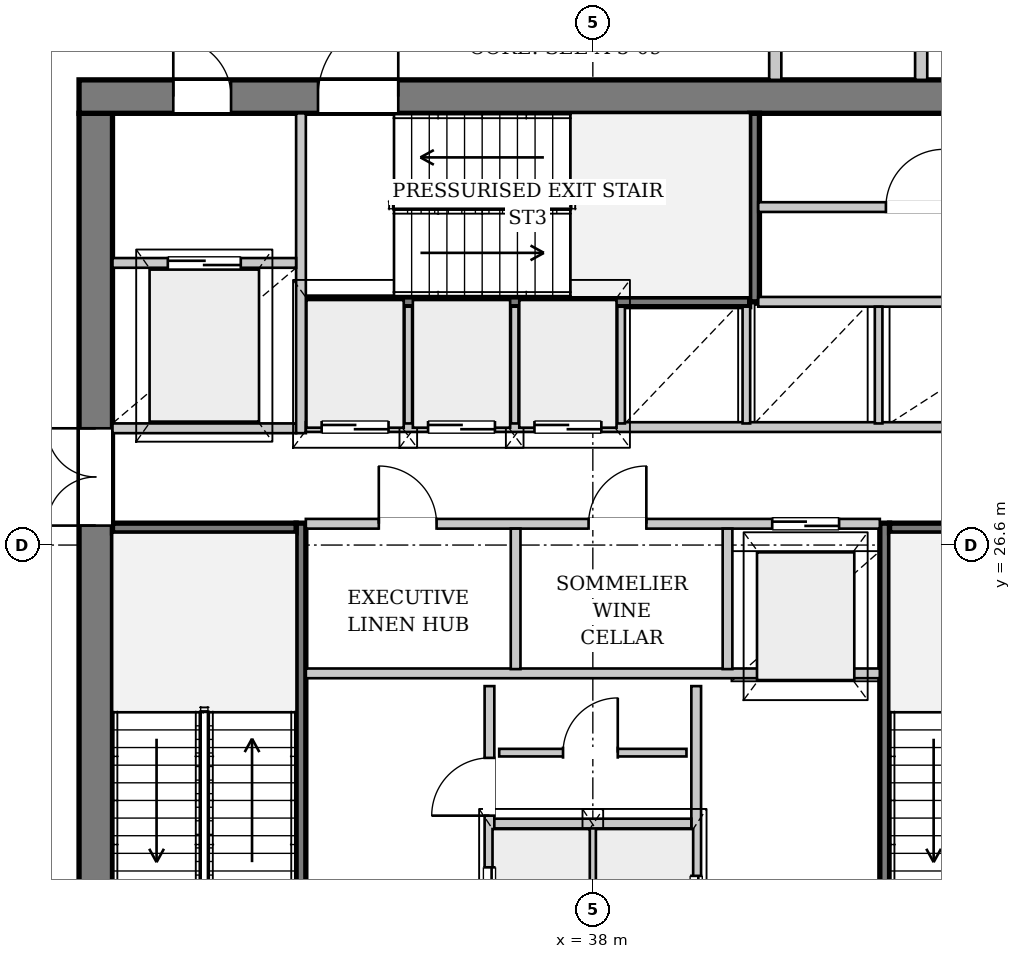
"""IFC4 building model, lengths in metres.
Left out: names, types, materials, properties, quantities, classifications, styles, units other than length and angle.
Written with IfcOpenShell. Run it as: python <this file> out.ifc"""

import sys

from ifc_helpers import new_model, si_unit, direction, frame, frame_2d, origin, place, context, subcontext, project, spatial, rectangle, extrude, source, transform, mapped, element, fill, save


model = new_model("IFC4")
c1 = context("Model", 3, precision=1e-05, world=origin(), true_north=direction((0.0, 1.0)))
c2 = subcontext(c1, "Body", "Model", "MODEL_VIEW")
j1 = project(units=[si_unit("LENGTHUNIT", "METRE"), si_unit("PLANEANGLEUNIT", "RADIAN")], contexts=[c1])
p1 = place(None, origin())
s1 = spatial("IfcSite", under=j1, at=p1, CompositionType="ELEMENT")
p2 = place(p1, origin())
s2 = spatial("IfcBuilding", under=s1, at=p2, CompositionType="ELEMENT")
p3 = place(p2, frame((0.0, 0.0, 160.8)))
s3 = spatial("IfcBuildingStorey", under=s2, at=p3, CompositionType="ELEMENT", Elevation=160.8)
p4 = place(p3, frame((29.825, 19.5, 0.0), z_axis=(0.0, 0.0, 1.0), x_axis=(0.0, 1.0, 0.0)))
e1 = element("IfcWall", 1, at=p4, inside=s3, PredefinedType="SHEAR", context=c2, shape_type="SweptSolid", body=[
    extrude(rectangle(XDim=14.2, YDim=0.55, at=frame_2d((7.1, 0.0))), origin(), (0.0, 0.0, 1.0), 3.33),
])
p5 = place(p4, frame((7.42, 0.0, 0.0)))
e2 = element("IfcOpeningElement", 2, at=p5, cuts=e1, PredefinedType="OPENING", context=c2, shape_type="SweptSolid", body=[
    extrude(rectangle(XDim=1.6, YDim=2.2, at=frame_2d((0.8, 1.1))), frame((0.0, 0.285, 0.0), z_axis=(0.0, -1.0, 0.0), x_axis=(1.0, 0.0, 0.0)), (0.0, 0.0, 1.0), 0.57),
])
p6 = place(p3, frame((29.55, 33.975, 0.0), z_axis=(0.0, 0.0, 1.0), x_axis=(1.0, 0.0, 0.0)))
e3 = element("IfcWall", 3, at=p6, inside=s3, PredefinedType="SHEAR", context=c2, shape_type="SweptSolid", body=[
    extrude(rectangle(XDim=16.9, YDim=0.55, at=frame_2d((8.45, 0.0))), origin(), (0.0, 0.0, 1.0), 3.33),
])
p7 = place(p6, frame((1.55, 0.0, 0.0)))
e4 = element("IfcOpeningElement", 4, at=p7, cuts=e3, PredefinedType="OPENING", context=c2, shape_type="SweptSolid", body=[
    extrude(rectangle(XDim=0.95, YDim=2.1, at=frame_2d((0.475, 1.05))), frame((0.0, 0.285, 0.0), z_axis=(0.0, -1.0, 0.0), x_axis=(1.0, 0.0, 0.0)), (0.0, 0.0, 1.0), 0.57),
])
p8 = place(p6, frame((3.93, 0.0, 0.0)))
e5 = element("IfcOpeningElement", 5, at=p8, cuts=e3, PredefinedType="OPENING", context=c2, shape_type="SweptSolid", body=[
    extrude(rectangle(XDim=1.32, YDim=2.2, at=frame_2d((0.66, 1.1))), frame((0.0, 0.285, 0.0), z_axis=(0.0, -1.0, 0.0), x_axis=(1.0, 0.0, 0.0)), (0.0, 0.0, 1.0), 0.57),
])
p9 = place(p3, frame((33.2, 19.5, 0.0), z_axis=(0.0, 0.0, 1.0), x_axis=(0.0, 1.0, 0.0)))
e6 = element("IfcWall", 6, at=p9, inside=s3, PredefinedType="PARTITIONING", context=c2, shape_type="SweptSolid", body=[
    extrude(rectangle(XDim=7.46, YDim=0.16, at=frame_2d((3.73, 0.0))), origin(), (0.0, 0.0, 1.0), 3.33),
])
p10 = place(p9, frame((0.08, 0.0, 0.0)))
e7 = element("IfcOpeningElement", 7, at=p10, cuts=e6, PredefinedType="OPENING", context=c2, shape_type="SweptSolid", body=[
    extrude(rectangle(XDim=1.32, YDim=2.2, at=frame_2d((0.66, 1.1))), frame((0.0, 0.09, 0.0), z_axis=(0.0, -1.0, 0.0), x_axis=(1.0, 0.0, 0.0)), (0.0, 0.0, 1.0), 0.18),
])
p11 = place(p3, frame((30.1, 26.88, 0.0), z_axis=(0.0, 0.0, 1.0), x_axis=(1.0, 0.0, 0.0)))
e8 = element("IfcWall", 8, at=p11, inside=s3, PredefinedType="PARTITIONING", context=c2, shape_type="SweptSolid", body=[
    extrude(rectangle(XDim=3.02, YDim=0.16, at=frame_2d((1.51, 0.0))), origin(), (0.0, 0.0, 1.0), 3.33),
])
p12 = place(p3, frame((42.8, 26.96, 0.0), z_axis=(0.0, 0.0, 1.0), x_axis=(0.0, -1.0, 0.0)))
e9 = element("IfcWall", 9, at=p12, inside=s3, PredefinedType="PARTITIONING", context=c2, shape_type="SweptSolid", body=[
    extrude(rectangle(XDim=7.46, YDim=0.16, at=frame_2d((3.73, 0.0))), origin(), (0.0, 0.0, 1.0), 3.33),
])
p13 = place(p12, frame((6.06, 0.0, 0.0)))
e10 = element("IfcOpeningElement", 10, at=p13, cuts=e9, PredefinedType="OPENING", context=c2, shape_type="SweptSolid", body=[
    extrude(rectangle(XDim=1.32, YDim=2.2, at=frame_2d((0.66, 1.1))), frame((0.0, 0.09, 0.0), z_axis=(0.0, -1.0, 0.0), x_axis=(1.0, 0.0, 0.0)), (0.0, 0.0, 1.0), 0.18),
])
p14 = place(p3, frame((42.88, 26.88, 0.0), z_axis=(0.0, 0.0, 1.0), x_axis=(1.0, 0.0, 0.0)))
e11 = element("IfcWall", 11, at=p14, inside=s3, PredefinedType="PARTITIONING", context=c2, shape_type="SweptSolid", body=[
    extrude(rectangle(XDim=3.02, YDim=0.16, at=frame_2d((1.51, 0.0))), origin(), (0.0, 0.0, 1.0), 3.33),
])
p15 = place(p3, frame((33.28, 30.6, 0.0), z_axis=(0.0, 0.0, 1.0), x_axis=(1.0, 0.0, 0.0)))
e12 = element("IfcWall", 12, at=p15, inside=s3, PredefinedType="PARTITIONING", context=c2, shape_type="SweptSolid", body=[
    extrude(rectangle(XDim=7.3, YDim=0.16, at=frame_2d((3.65, 0.0))), origin(), (0.0, 0.0, 1.0), 3.33),
])
p16 = place(p3, frame((40.66, 30.6, 0.0), z_axis=(0.0, 0.0, 1.0), x_axis=(0.0, 1.0, 0.0)))
e13 = element("IfcWall", 13, at=p16, inside=s3, PredefinedType="PARTITIONING", context=c2, shape_type="SweptSolid", body=[
    extrude(rectangle(XDim=3.1, YDim=0.16, at=frame_2d((1.55, 0.0))), origin(), (0.0, 0.0, 1.0), 3.33),
])
p17 = place(p3, frame((36.3, 19.5, 0.0), z_axis=(0.0, 0.0, 1.0), x_axis=(0.0, 1.0, 0.0)))
e14 = element("IfcWall", 14, at=p17, inside=s3, PredefinedType="PARTITIONING", context=c2, shape_type="SweptSolid", body=[
    extrude(rectangle(XDim=4.78, YDim=0.16, at=frame_2d((2.39, 0.0))), origin(), (0.0, 0.0, 1.0), 3.33),
])
p18 = place(p17, frame((0.6, 0.0, 0.0)))
e15 = element("IfcOpeningElement", 15, at=p18, cuts=e14, PredefinedType="OPENING", context=c2, shape_type="SweptSolid", body=[
    extrude(rectangle(XDim=1.2, YDim=2.2, at=frame_2d((0.6, 1.1))), frame((0.0, 0.09, 0.0), z_axis=(0.0, -1.0, 0.0), x_axis=(1.0, 0.0, 0.0)), (0.0, 0.0, 1.0), 0.18),
])
p19 = place(p17, frame((2.65, 0.0, 0.0)))
e16 = element("IfcOpeningElement", 16, at=p19, cuts=e14, PredefinedType="OPENING", context=c2, shape_type="SweptSolid", body=[
    extrude(rectangle(XDim=0.95, YDim=2.1, at=frame_2d((0.475, 1.05))), frame((0.0, 0.09, 0.0), z_axis=(0.0, -1.0, 0.0), x_axis=(1.0, 0.0, 0.0)), (0.0, 0.0, 1.0), 0.18),
])
p20 = place(p3, frame((39.7, 24.28, 0.0), z_axis=(0.0, 0.0, 1.0), x_axis=(0.0, -1.0, 0.0)))
e17 = element("IfcWall", 17, at=p20, inside=s3, PredefinedType="PARTITIONING", context=c2, shape_type="SweptSolid", body=[
    extrude(rectangle(XDim=4.78, YDim=0.16, at=frame_2d((2.39, 0.0))), origin(), (0.0, 0.0, 1.0), 3.33),
])
p21 = place(p20, frame((3.12, 0.0, 0.0)))
e18 = element("IfcOpeningElement", 18, at=p21, cuts=e17, PredefinedType="OPENING", context=c2, shape_type="SweptSolid", body=[
    extrude(rectangle(XDim=1.2, YDim=2.2, at=frame_2d((0.6, 1.1))), frame((0.0, 0.09, 0.0), z_axis=(0.0, -1.0, 0.0), x_axis=(1.0, 0.0, 0.0)), (0.0, 0.0, 1.0), 0.18),
])
p22 = place(p3, frame((38.0, 19.5, 0.0), z_axis=(0.0, 0.0, 1.0), x_axis=(0.0, 1.0, 0.0)))
e19 = element("IfcWall", 19, at=p22, inside=s3, PredefinedType="PARTITIONING", context=c2, shape_type="SweptSolid", body=[
    extrude(rectangle(XDim=2.46, YDim=0.125, at=frame_2d((1.23, 0.0))), origin(), (0.0, 0.0, 1.0), 3.33),
])
p23 = place(p3, frame((36.38, 22.02, 0.0), z_axis=(0.0, 0.0, 1.0), x_axis=(1.0, 0.0, 0.0)))
e20 = element("IfcWall", 20, at=p23, inside=s3, PredefinedType="PARTITIONING", context=c2, shape_type="SweptSolid", body=[
    extrude(rectangle(XDim=3.24, YDim=0.16, at=frame_2d((1.62, 0.0))), origin(), (0.0, 0.0, 1.0), 3.33),
])
p24 = place(p3, frame((33.28, 24.49, 0.0), z_axis=(0.0, 0.0, 1.0), x_axis=(1.0, 0.0, 0.0)))
e21 = element("IfcWall", 21, at=p24, inside=s3, PredefinedType="PARTITIONING", context=c2, shape_type="SweptSolid", body=[
    extrude(rectangle(XDim=9.44, YDim=0.16, at=frame_2d((4.72, 0.0))), origin(), (0.0, 0.0, 1.0), 3.33),
])
p25 = place(p3, frame((36.46, 23.186, 0.0), z_axis=(0.0, 0.0, 1.0), x_axis=(1.0, 0.0, 0.0)))
e22 = element("IfcWall", 22, at=p25, inside=s3, PredefinedType="PARTITIONING", context=c2, shape_type="SweptSolid", body=[
    extrude(rectangle(XDim=3.08, YDim=0.125, at=frame_2d((1.54, 0.0))), origin(), (0.0, 0.0, 1.0), 3.33),
])
p26 = place(p25, frame((1.05, 0.0, 0.0)))
e23 = element("IfcOpeningElement", 23, at=p26, cuts=e22, PredefinedType="OPENING", context=c2, shape_type="SweptSolid", body=[
    extrude(rectangle(XDim=0.9, YDim=2.1, at=frame_2d((0.45, 1.05))), frame((0.0, 0.073, 0.0), z_axis=(0.0, -1.0, 0.0), x_axis=(1.0, 0.0, 0.0)), (0.0, 0.0, 1.0), 0.145),
])
p27 = place(p3, frame((30.1, 28.52, 0.0), z_axis=(0.0, 0.0, 1.0), x_axis=(1.0, 0.0, 0.0)))
e24 = element("IfcWall", 24, at=p27, inside=s3, PredefinedType="PARTITIONING", context=c2, shape_type="SweptSolid", body=[
    extrude(rectangle(XDim=3.02, YDim=0.16, at=frame_2d((1.51, 0.0))), origin(), (0.0, 0.0, 1.0), 3.33),
])
p28 = place(p3, frame((33.2, 28.44, 0.0), z_axis=(0.0, 0.0, 1.0), x_axis=(0.0, 1.0, 0.0)))
e25 = element("IfcWall", 25, at=p28, inside=s3, PredefinedType="PARTITIONING", context=c2, shape_type="SweptSolid", body=[
    extrude(rectangle(XDim=5.26, YDim=0.16, at=frame_2d((2.63, 0.0))), origin(), (0.0, 0.0, 1.0), 3.33),
])
p29 = place(p3, frame((30.1, 31.24, 0.0), z_axis=(0.0, 0.0, 1.0), x_axis=(1.0, 0.0, 0.0)))
e26 = element("IfcWall", 26, at=p29, inside=s3, PredefinedType="PARTITIONING", context=c2, shape_type="SweptSolid", body=[
    extrude(rectangle(XDim=3.02, YDim=0.16, at=frame_2d((1.51, 0.0))), origin(), (0.0, 0.0, 1.0), 3.33),
])
p30 = place(p29, frame((0.91, 0.0, 0.0)))
e27 = element("IfcOpeningElement", 27, at=p30, cuts=e26, PredefinedType="OPENING", context=c2, shape_type="SweptSolid", body=[
    extrude(rectangle(XDim=1.2, YDim=2.2, at=frame_2d((0.6, 1.1))), frame((0.0, 0.09, 0.0), z_axis=(0.0, -1.0, 0.0), x_axis=(1.0, 0.0, 0.0)), (0.0, 0.0, 1.0), 0.18),
])
p31 = place(p3, frame((33.28, 26.95, 0.0), z_axis=(0.0, 0.0, 1.0), x_axis=(1.0, 0.0, 0.0)))
e28 = element("IfcWall", 28, at=p31, inside=s3, PredefinedType="PARTITIONING", context=c2, shape_type="SweptSolid", body=[
    extrude(rectangle(XDim=9.44, YDim=0.16, at=frame_2d((4.72, 0.0))), origin(), (0.0, 0.0, 1.0), 3.33),
])
p32 = place(p31, frame((1.2, 0.0, 0.0)))
e29 = element("IfcOpeningElement", 29, at=p32, cuts=e28, PredefinedType="OPENING", context=c2, shape_type="SweptSolid", body=[
    extrude(rectangle(XDim=0.95, YDim=2.1, at=frame_2d((0.475, 1.05))), frame((0.0, 0.09, 0.0), z_axis=(0.0, -1.0, 0.0), x_axis=(1.0, 0.0, 0.0)), (0.0, 0.0, 1.0), 0.18),
])
p33 = place(p31, frame((4.65, 0.0, 0.0)))
e30 = element("IfcOpeningElement", 30, at=p33, cuts=e28, PredefinedType="OPENING", context=c2, shape_type="SweptSolid", body=[
    extrude(rectangle(XDim=0.95, YDim=2.1, at=frame_2d((0.475, 1.05))), frame((0.0, 0.09, 0.0), z_axis=(0.0, -1.0, 0.0), x_axis=(1.0, 0.0, 0.0)), (0.0, 0.0, 1.0), 0.18),
])
p34 = place(p31, frame((7.67, 0.0, 0.0)))
e31 = element("IfcOpeningElement", 31, at=p34, cuts=e28, PredefinedType="OPENING", context=c2, shape_type="SweptSolid", body=[
    extrude(rectangle(XDim=1.1, YDim=2.2, at=frame_2d((0.55, 1.1))), frame((0.0, 0.09, 0.0), z_axis=(0.0, -1.0, 0.0), x_axis=(1.0, 0.0, 0.0)), (0.0, 0.0, 1.0), 0.18),
])
for number, where, z_axis, x_axis in (
    (32, (36.73, 24.56, 0.0), (0.0, 0.0, 1.0), (0.0, 1.0, 0.0)),
    (33, (40.215, 24.56, 0.0), (0.0, 0.0, 1.0), (0.0, 1.0, 0.0)),
):
    element("IfcWall", number, at=place(p3, frame(where, z_axis=z_axis, x_axis=x_axis)), inside=s3, PredefinedType="PARTITIONING", context=c2, shape_type="SweptSolid", body=[
        extrude(rectangle(XDim=2.31, YDim=0.16, at=frame_2d((1.155, 0.0))), origin(), (0.0, 0.0, 1.0), 3.33),
    ])
p35 = place(p3, frame((33.28, 28.54, 0.0), z_axis=(0.0, 0.0, 1.0), x_axis=(1.0, 0.0, 0.0)))
e34 = element("IfcWall", 34, at=p35, inside=s3, PredefinedType="PARTITIONING", context=c2, shape_type="SweptSolid", body=[
    extrude(rectangle(XDim=12.62, YDim=0.16, at=frame_2d((6.31, 0.0))), origin(), (0.0, 0.0, 1.0), 3.33),
])
p36 = place(p35, frame((0.26, 0.0, 0.0)))
e35 = element("IfcOpeningElement", 35, at=p36, cuts=e34, PredefinedType="OPENING", context=c2, shape_type="SweptSolid", body=[
    extrude(rectangle(XDim=1.1, YDim=2.2, at=frame_2d((0.55, 1.1))), frame((0.0, 0.09, 0.0), z_axis=(0.0, -1.0, 0.0), x_axis=(1.0, 0.0, 0.0)), (0.0, 0.0, 1.0), 0.18),
])
p37 = place(p35, frame((2.01, 0.0, 0.0)))
e36 = element("IfcOpeningElement", 36, at=p37, cuts=e34, PredefinedType="OPENING", context=c2, shape_type="SweptSolid", body=[
    extrude(rectangle(XDim=1.1, YDim=2.2, at=frame_2d((0.55, 1.1))), frame((0.0, 0.09, 0.0), z_axis=(0.0, -1.0, 0.0), x_axis=(1.0, 0.0, 0.0)), (0.0, 0.0, 1.0), 0.18),
])
p38 = place(p35, frame((3.76, 0.0, 0.0)))
e37 = element("IfcOpeningElement", 37, at=p38, cuts=e34, PredefinedType="OPENING", context=c2, shape_type="SweptSolid", body=[
    extrude(rectangle(XDim=1.1, YDim=2.2, at=frame_2d((0.55, 1.1))), frame((0.0, 0.09, 0.0), z_axis=(0.0, -1.0, 0.0), x_axis=(1.0, 0.0, 0.0)), (0.0, 0.0, 1.0), 0.18),
])
p39 = place(p3, frame((40.72, 30.6, 0.0), z_axis=(0.0, 0.0, 1.0), x_axis=(1.0, 0.0, 0.0)))
e38 = element("IfcWall", 38, at=p39, inside=s3, PredefinedType="PARTITIONING", context=c2, shape_type="SweptSolid", body=[
    extrude(rectangle(XDim=5.18, YDim=0.16, at=frame_2d((2.59, 0.0))), origin(), (0.0, 0.0, 1.0), 3.33),
])
for number, where, z_axis, x_axis in (
    (39, (34.965, 28.6, 0.0), (0.0, 0.0, 1.0), (0.0, 1.0, 0.0)),
    (40, (36.715, 28.6, 0.0), (0.0, 0.0, 1.0), (0.0, 1.0, 0.0)),
    (41, (38.465, 28.6, 0.0), (0.0, 0.0, 1.0), (0.0, 1.0, 0.0)),
    (42, (40.525, 28.6, 0.0), (0.0, 0.0, 1.0), (0.0, 1.0, 0.0)),
    (43, (42.7, 28.6, 0.0), (0.0, 0.0, 1.0), (0.0, 1.0, 0.0)),
):
    element("IfcWall", number, at=place(p3, frame(where, z_axis=z_axis, x_axis=x_axis)), inside=s3, PredefinedType="PARTITIONING", context=c2, shape_type="SweptSolid", body=[
        extrude(rectangle(XDim=1.92, YDim=0.125, at=frame_2d((0.96, 0.0))), origin(), (0.0, 0.0, 1.0), 3.33),
    ])
p40 = place(p3, frame((40.72, 32.158, 0.0), z_axis=(0.0, 0.0, 1.0), x_axis=(1.0, 0.0, 0.0)))
e44 = element("IfcWall", 44, at=p40, inside=s3, PredefinedType="PARTITIONING", context=c2, shape_type="SweptSolid", body=[
    extrude(rectangle(XDim=5.03, YDim=0.16, at=frame_2d((2.515, 0.0))), origin(), (0.0, 0.0, 1.0), 3.33),
])
p41 = place(p40, frame((2.1, 0.0, 0.0)))
e45 = element("IfcOpeningElement", 45, at=p41, cuts=e44, PredefinedType="OPENING", context=c2, shape_type="SweptSolid", body=[
    extrude(rectangle(XDim=0.95, YDim=2.1, at=frame_2d((0.475, 1.05))), frame((0.0, 0.09, 0.0), z_axis=(0.0, -1.0, 0.0), x_axis=(1.0, 0.0, 0.0)), (0.0, 0.0, 1.0), 0.18),
])
for number, where, z_axis, x_axis in (
    (46, (41.0, 34.25, 0.0), (0.0, 0.0, 1.0), (0.0, 1.0, 0.0)),
    (47, (43.4, 34.25, 0.0), (0.0, 0.0, 1.0), (0.0, 1.0, 0.0)),
):
    element("IfcWall", number, at=place(p3, frame(where, z_axis=z_axis, x_axis=x_axis)), inside=s3, PredefinedType="PARTITIONING", context=c2, shape_type="SweptSolid", body=[
        extrude(rectangle(XDim=1.95, YDim=0.2, at=frame_2d((0.975, 0.0))), origin(), (0.0, 0.0, 1.0), 3.33),
    ])
m1 = source(origin(), c2, "Body", "SweptSolid", [
    extrude(rectangle(XDim=1.6, YDim=2.2, at=frame_2d((0.8, 1.1))), frame((0.0, 0.025, 0.0), z_axis=(0.0, -1.0, 0.0), x_axis=(1.0, 0.0, 0.0)), (0.0, 0.0, 1.0), 0.05),
])
p42 = place(p5, origin())
e48 = element("IfcDoor", 48, at=p42, inside=s3, OperationType="DOUBLE_DOOR_SINGLE_SWING", PredefinedType="DOOR", context=c2, shape_type="MappedRepresentation", body=[
    mapped(m1, transform((0.0, 0.0, 0.0), x_axis=(1.0, 0.0, 0.0), y_axis=(0.0, 1.0, 0.0), z_axis=(0.0, 0.0, 1.0), scale=1.0)),
])
fill(e2, e48)
m2 = source(origin(), c2, "Body", "SweptSolid", [
    extrude(rectangle(XDim=0.95, YDim=2.1, at=frame_2d((0.475, 1.05))), frame((0.0, 0.025, 0.0), z_axis=(0.0, -1.0, 0.0), x_axis=(1.0, 0.0, 0.0)), (0.0, 0.0, 1.0), 0.05),
])
p43 = place(p7, origin())
e49 = element("IfcDoor", 49, at=p43, inside=s3, OperationType="SINGLE_SWING_LEFT", PredefinedType="DOOR", context=c2, shape_type="MappedRepresentation", body=[
    mapped(m2, transform((0.0, 0.0, 0.0), x_axis=(1.0, 0.0, 0.0), y_axis=(0.0, 1.0, 0.0), z_axis=(0.0, 0.0, 1.0), scale=1.0)),
])
fill(e4, e49)
m3 = source(origin(), c2, "Body", "SweptSolid", [
    extrude(rectangle(XDim=1.32, YDim=2.2, at=frame_2d((0.66, 1.1))), frame((0.0, 0.025, 0.0), z_axis=(0.0, -1.0, 0.0), x_axis=(1.0, 0.0, 0.0)), (0.0, 0.0, 1.0), 0.05),
])
p44 = place(p8, origin())
e50 = element("IfcDoor", 50, at=p44, inside=s3, OperationType="SINGLE_SWING_RIGHT", PredefinedType="DOOR", context=c2, shape_type="MappedRepresentation", body=[
    mapped(m3, transform((0.0, 0.0, 0.0), x_axis=(1.0, 0.0, 0.0), y_axis=(0.0, 1.0, 0.0), z_axis=(0.0, 0.0, 1.0), scale=1.0)),
])
fill(e5, e50)
m4 = source(origin(), c2, "Body", "SweptSolid", [
    extrude(rectangle(XDim=1.2, YDim=2.2, at=frame_2d((0.6, 1.1))), frame((0.0, 0.025, 0.0), z_axis=(0.0, -1.0, 0.0), x_axis=(1.0, 0.0, 0.0)), (0.0, 0.0, 1.0), 0.05),
])
p45 = place(p18, origin())
e51 = element("IfcDoor", 51, at=p45, inside=s3, OperationType="DOUBLE_DOOR_SLIDING", PredefinedType="DOOR", context=c2, shape_type="MappedRepresentation", body=[
    mapped(m4, transform((0.0, 0.0, 0.0), x_axis=(1.0, 0.0, 0.0), y_axis=(0.0, 1.0, 0.0), z_axis=(0.0, 0.0, 1.0), scale=1.0)),
])
fill(e15, e51)
p46 = place(p19, origin())
e52 = element("IfcDoor", 52, at=p46, inside=s3, OperationType="SINGLE_SWING_LEFT", PredefinedType="DOOR", context=c2, shape_type="MappedRepresentation", body=[
    mapped(m2, transform((0.0, 0.0, 0.0), x_axis=(1.0, 0.0, 0.0), y_axis=(0.0, 1.0, 0.0), z_axis=(0.0, 0.0, 1.0), scale=1.0)),
])
fill(e16, e52)
m5 = source(origin(), c2, "Body", "SweptSolid", [
    extrude(rectangle(XDim=0.9, YDim=2.1, at=frame_2d((0.45, 1.05))), frame((0.0, 0.025, 0.0), z_axis=(0.0, -1.0, 0.0), x_axis=(1.0, 0.0, 0.0)), (0.0, 0.0, 1.0), 0.05),
])
p47 = place(p26, origin())
e53 = element("IfcDoor", 53, at=p47, inside=s3, OperationType="SINGLE_SWING_RIGHT", PredefinedType="DOOR", context=c2, shape_type="MappedRepresentation", body=[
    mapped(m5, transform((0.0, 0.0, 0.0), x_axis=(1.0, 0.0, 0.0), y_axis=(0.0, 1.0, 0.0), z_axis=(0.0, 0.0, 1.0), scale=1.0)),
])
fill(e23, e53)
p48 = place(p21, origin())
e54 = element("IfcDoor", 54, at=p48, inside=s3, OperationType="DOUBLE_DOOR_SLIDING", PredefinedType="DOOR", context=c2, shape_type="MappedRepresentation", body=[
    mapped(m4, transform((0.0, 0.0, 0.0), x_axis=(1.0, 0.0, 0.0), y_axis=(0.0, 1.0, 0.0), z_axis=(0.0, 0.0, 1.0), scale=1.0)),
])
fill(e18, e54)
p49 = place(p30, origin())
e55 = element("IfcDoor", 55, at=p49, inside=s3, OperationType="DOUBLE_DOOR_SLIDING", PredefinedType="DOOR", context=c2, shape_type="MappedRepresentation", body=[
    mapped(m4, transform((0.0, 0.0, 0.0), x_axis=(1.0, 0.0, 0.0), y_axis=(0.0, 1.0, 0.0), z_axis=(0.0, 0.0, 1.0), scale=1.0)),
])
fill(e27, e55)
p50 = place(p32, origin())
e56 = element("IfcDoor", 56, at=p50, inside=s3, OperationType="SINGLE_SWING_LEFT", PredefinedType="DOOR", context=c2, shape_type="MappedRepresentation", body=[
    mapped(m2, transform((0.0, 0.0, 0.0), x_axis=(1.0, 0.0, 0.0), y_axis=(0.0, 1.0, 0.0), z_axis=(0.0, 0.0, 1.0), scale=1.0)),
])
fill(e29, e56)
p51 = place(p33, origin())
e57 = element("IfcDoor", 57, at=p51, inside=s3, OperationType="SINGLE_SWING_RIGHT", PredefinedType="DOOR", context=c2, shape_type="MappedRepresentation", body=[
    mapped(m2, transform((0.0, 0.0, 0.0), x_axis=(1.0, 0.0, 0.0), y_axis=(0.0, 1.0, 0.0), z_axis=(0.0, 0.0, 1.0), scale=1.0)),
])
fill(e30, e57)
m6 = source(origin(), c2, "Body", "SweptSolid", [
    extrude(rectangle(XDim=1.1, YDim=2.2, at=frame_2d((0.55, 1.1))), frame((0.0, 0.025, 0.0), z_axis=(0.0, -1.0, 0.0), x_axis=(1.0, 0.0, 0.0)), (0.0, 0.0, 1.0), 0.05),
])
p52 = place(p34, origin())
e58 = element("IfcDoor", 58, at=p52, inside=s3, OperationType="DOUBLE_DOOR_SLIDING", PredefinedType="DOOR", context=c2, shape_type="MappedRepresentation", body=[
    mapped(m6, transform((0.0, 0.0, 0.0), x_axis=(1.0, 0.0, 0.0), y_axis=(0.0, 1.0, 0.0), z_axis=(0.0, 0.0, 1.0), scale=1.0)),
])
fill(e31, e58)
p53 = place(p36, origin())
e59 = element("IfcDoor", 59, at=p53, inside=s3, OperationType="DOUBLE_DOOR_SLIDING", PredefinedType="DOOR", context=c2, shape_type="MappedRepresentation", body=[
    mapped(m6, transform((0.0, 0.0, 0.0), x_axis=(1.0, 0.0, 0.0), y_axis=(0.0, 1.0, 0.0), z_axis=(0.0, 0.0, 1.0), scale=1.0)),
])
fill(e35, e59)
p54 = place(p37, origin())
e60 = element("IfcDoor", 60, at=p54, inside=s3, OperationType="DOUBLE_DOOR_SLIDING", PredefinedType="DOOR", context=c2, shape_type="MappedRepresentation", body=[
    mapped(m6, transform((0.0, 0.0, 0.0), x_axis=(1.0, 0.0, 0.0), y_axis=(0.0, 1.0, 0.0), z_axis=(0.0, 0.0, 1.0), scale=1.0)),
])
fill(e36, e60)
p55 = place(p38, origin())
e61 = element("IfcDoor", 61, at=p55, inside=s3, OperationType="DOUBLE_DOOR_SLIDING", PredefinedType="DOOR", context=c2, shape_type="MappedRepresentation", body=[
    mapped(m6, transform((0.0, 0.0, 0.0), x_axis=(1.0, 0.0, 0.0), y_axis=(0.0, 1.0, 0.0), z_axis=(0.0, 0.0, 1.0), scale=1.0)),
])
fill(e37, e61)
p56 = place(p41, origin())
e62 = element("IfcDoor", 62, at=p56, inside=s3, OperationType="SINGLE_SWING_RIGHT", PredefinedType="DOOR", context=c2, shape_type="MappedRepresentation", body=[
    mapped(m2, transform((0.0, 0.0, 0.0), x_axis=(1.0, 0.0, 0.0), y_axis=(0.0, 1.0, 0.0), z_axis=(0.0, 0.0, 1.0), scale=1.0)),
])
fill(e45, e62)
save(model, sys.argv[1])
